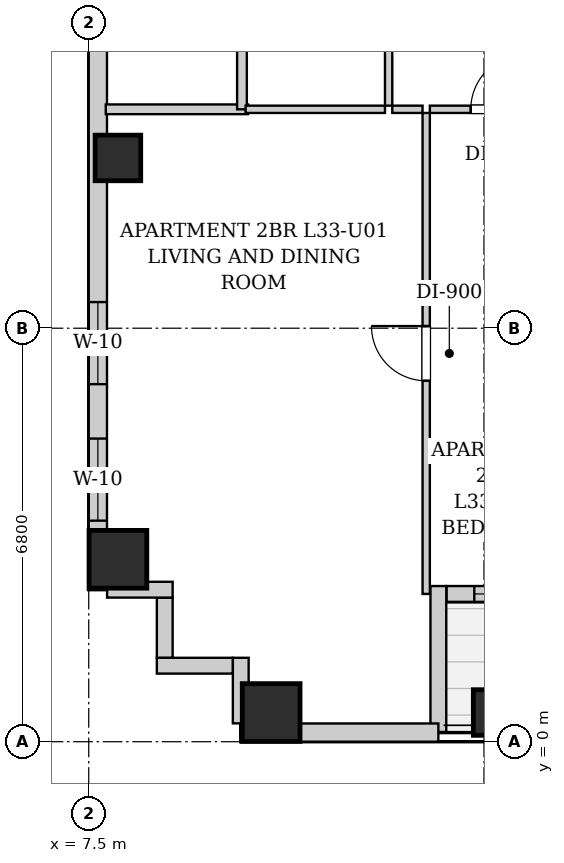
"""IFC4 building model, lengths in metres.
Left out: names, types, materials, properties, quantities, classifications, styles, units other than length and angle.
Written with IfcOpenShell. Run it as: python <this file> out.ifc"""

import sys

from ifc_helpers import new_model, si_unit, direction, frame, frame_2d, origin, origin_2d, place, context, subcontext, project, spatial, rectangle, extrude, element, fill, save


model = new_model("IFC4")
c1 = context("Model", 3, precision=1e-05, world=origin(), true_north=direction((0.0, 1.0)))
c2 = subcontext(c1, "Body", "Model", "MODEL_VIEW")
j1 = project(units=[si_unit("LENGTHUNIT", "METRE"), si_unit("PLANEANGLEUNIT", "RADIAN")], contexts=[c1])
p1 = place(None, origin())
s1 = spatial("IfcSite", under=j1, at=p1, CompositionType="ELEMENT")
p2 = place(p1, origin())
s2 = spatial("IfcBuilding", under=s1, at=p2, CompositionType="ELEMENT")
p3 = place(p2, frame((0.0, 0.0, 116.7)))
s3 = spatial("IfcBuildingStorey", under=s2, at=p3, CompositionType="ELEMENT", Elevation=116.7)
p4 = place(p3, frame((10.5, 0.48, 0.0), z_axis=(0.0, 0.0, 1.0), x_axis=(1.0, 0.0, 0.0)))
e1 = element("IfcColumn", 1, at=p4, inside=s3, PredefinedType="COLUMN", context=c2, shape_type="SweptSolid", body=[
    extrude(rectangle(XDim=0.95, YDim=0.95, at=origin_2d()), origin(), (0.0, 0.0, 1.0), 3.2),
])
p5 = place(p3, frame((14.2, 0.48, 0.0), z_axis=(0.0, 0.0, 1.0), x_axis=(1.0, 0.0, 0.0)))
e2 = element("IfcColumn", 2, at=p5, inside=s3, PredefinedType="COLUMN", context=c2, shape_type="SweptSolid", body=[
    extrude(rectangle(XDim=0.75, YDim=0.75, at=origin_2d()), origin(), (0.0, 0.0, 1.0), 3.2),
])
p6 = place(p3, frame((7.98, 3.0, 0.0), z_axis=(0.0, 0.0, 1.0), x_axis=(1.0, 0.0, 0.0)))
e3 = element("IfcColumn", 3, at=p6, inside=s3, PredefinedType="COLUMN", context=c2, shape_type="SweptSolid", body=[
    extrude(rectangle(XDim=0.95, YDim=0.95, at=origin_2d()), origin(), (0.0, 0.0, 1.0), 3.2),
])
p7 = place(p3, frame((7.98, 9.6, 0.0), z_axis=(0.0, 0.0, 1.0), x_axis=(1.0, 0.0, 0.0)))
e4 = element("IfcColumn", 4, at=p7, inside=s3, PredefinedType="COLUMN", context=c2, shape_type="SweptSolid", body=[
    extrude(rectangle(XDim=0.75, YDim=0.75, at=origin_2d()), origin(), (0.0, 0.0, 1.0), 3.2),
])
p8 = place(p3, frame((18.816, 2.43, 0.0), z_axis=(0.0, 0.0, 1.0), x_axis=(-1.0, 0.0, 0.0)))
e5 = element("IfcWall", 5, at=p8, inside=s3, PredefinedType="SOLIDWALL", context=c2, shape_type="SweptSolid", body=[
    extrude(rectangle(XDim=5.432, YDim=0.26, at=frame_2d((2.716, 0.0))), origin(), (0.0, 0.0, 1.0), 2.88),
])
p9 = place(p8, frame((2.161, 0.0, 0.0)))
e6 = element("IfcOpeningElement", 6, at=p9, cuts=e5, PredefinedType="OPENING", context=c2, shape_type="SweptSolid", body=[
    extrude(rectangle(XDim=1.1, YDim=2.0, at=frame_2d((0.55, 1.0))), frame((0.0, 0.14, 0.0), z_axis=(0.0, -1.0, 0.0), x_axis=(1.0, 0.0, 0.0)), (0.0, 0.0, 1.0), 0.28),
])
p10 = place(p8, frame((3.625, 0.0, 0.85)))
e7 = element("IfcOpeningElement", 7, at=p10, cuts=e5, PredefinedType="OPENING", context=c2, shape_type="SweptSolid", body=[
    extrude(rectangle(XDim=1.35, YDim=1.65, at=frame_2d((0.675, 0.825))), frame((0.0, 0.14, 0.0), z_axis=(0.0, -1.0, 0.0), x_axis=(1.0, 0.0, 0.0)), (0.0, 0.0, 1.0), 0.28),
])
p11 = place(p8, frame((1.321, 0.0, 0.55)))
e8 = element("IfcOpeningElement", 8, at=p11, cuts=e5, PredefinedType="OPENING", context=c2, shape_type="SweptSolid", body=[
    extrude(rectangle(XDim=0.68, YDim=1.2, at=frame_2d((0.34, 0.6))), frame((0.0, 0.14, 0.0), z_axis=(0.0, -1.0, 0.0), x_axis=(1.0, 0.0, 0.0)), (0.0, 0.0, 1.0), 0.28),
])
p12 = place(p3, frame((13.25, 2.56, 0.0), z_axis=(0.0, 0.0, 1.0), x_axis=(0.0, -1.0, 0.0)))
e9 = element("IfcWall", 9, at=p12, inside=s3, PredefinedType="SOLIDWALL", context=c2, shape_type="SweptSolid", body=[
    extrude(rectangle(XDim=2.4, YDim=0.26, at=frame_2d((1.2, 0.0))), origin(), (0.0, 0.0, 1.0), 2.88),
])
p13 = place(p3, frame((13.25, 0.15, 0.0), z_axis=(0.0, 0.0, 1.0), x_axis=(-1.0, 0.0, 0.0)))
e10 = element("IfcWall", 10, at=p13, inside=s3, PredefinedType="SOLIDWALL", context=c2, shape_type="SweptSolid", body=[
    extrude(rectangle(XDim=3.25, YDim=0.3, at=frame_2d((1.625, 0.0))), origin(), (0.0, 0.0, 1.0), 2.88),
])
p14 = place(p3, frame((7.65, 2.5, 0.0), z_axis=(0.0, 0.0, 1.0), x_axis=(0.0, 1.0, 0.0)))
e11 = element("IfcWall", 11, at=p14, inside=s3, PredefinedType="SOLIDWALL", context=c2, shape_type="SweptSolid", body=[
    extrude(rectangle(XDim=38.3, YDim=0.3, at=frame_2d((19.15, 0.0))), origin(), (0.0, 0.0, 1.0), 2.88),
])
p15 = place(p14, frame((3.38, 0.0, 0.55)))
e12 = element("IfcOpeningElement", 12, at=p15, cuts=e11, PredefinedType="OPENING", context=c2, shape_type="SweptSolid", body=[
    extrude(rectangle(XDim=1.35, YDim=1.2, at=frame_2d((0.675, 0.6))), frame((0.0, 0.16, 0.0), z_axis=(0.0, -1.0, 0.0), x_axis=(1.0, 0.0, 0.0)), (0.0, 0.0, 1.0), 0.32),
])
p16 = place(p14, frame((1.135, 0.0, 0.55)))
e13 = element("IfcOpeningElement", 13, at=p16, cuts=e11, PredefinedType="OPENING", context=c2, shape_type="SweptSolid", body=[
    extrude(rectangle(XDim=1.35, YDim=1.2, at=frame_2d((0.675, 0.6))), frame((0.0, 0.16, 0.0), z_axis=(0.0, -1.0, 0.0), x_axis=(1.0, 0.0, 0.0)), (0.0, 0.0, 1.0), 0.32),
])
p17 = place(p14, frame((33.946, 0.0, 0.55)))
e14 = element("IfcOpeningElement", 14, at=p17, cuts=e11, PredefinedType="OPENING", context=c2, shape_type="SweptSolid", body=[
    extrude(rectangle(XDim=1.35, YDim=1.2, at=frame_2d((0.675, 0.6))), frame((0.0, 0.16, 0.0), z_axis=(0.0, -1.0, 0.0), x_axis=(1.0, 0.0, 0.0)), (0.0, 0.0, 1.0), 0.32),
])
p18 = place(p14, frame((32.035, 0.0, 0.55)))
e15 = element("IfcOpeningElement", 15, at=p18, cuts=e11, PredefinedType="OPENING", context=c2, shape_type="SweptSolid", body=[
    extrude(rectangle(XDim=1.35, YDim=1.2, at=frame_2d((0.675, 0.6))), frame((0.0, 0.16, 0.0), z_axis=(0.0, -1.0, 0.0), x_axis=(1.0, 0.0, 0.0)), (0.0, 0.0, 1.0), 0.32),
])
p19 = place(p14, frame((15.65, 0.0, 0.55)))
e16 = element("IfcOpeningElement", 16, at=p19, cuts=e11, PredefinedType="OPENING", context=c2, shape_type="SweptSolid", body=[
    extrude(rectangle(XDim=1.35, YDim=1.2, at=frame_2d((0.675, 0.6))), frame((0.0, 0.16, 0.0), z_axis=(0.0, -1.0, 0.0), x_axis=(1.0, 0.0, 0.0)), (0.0, 0.0, 1.0), 0.32),
])
p20 = place(p14, frame((13.035, 0.0, 0.55)))
e17 = element("IfcOpeningElement", 17, at=p20, cuts=e11, PredefinedType="OPENING", context=c2, shape_type="SweptSolid", body=[
    extrude(rectangle(XDim=1.35, YDim=1.2, at=frame_2d((0.675, 0.6))), frame((0.0, 0.16, 0.0), z_axis=(0.0, -1.0, 0.0), x_axis=(1.0, 0.0, 0.0)), (0.0, 0.0, 1.0), 0.32),
])
p21 = place(p14, frame((22.831, 0.0, 0.55)))
e18 = element("IfcOpeningElement", 18, at=p21, cuts=e11, PredefinedType="OPENING", context=c2, shape_type="SweptSolid", body=[
    extrude(rectangle(XDim=1.35, YDim=1.2, at=frame_2d((0.675, 0.6))), frame((0.0, 0.16, 0.0), z_axis=(0.0, -1.0, 0.0), x_axis=(1.0, 0.0, 0.0)), (0.0, 0.0, 1.0), 0.32),
])
p22 = place(p14, frame((24.441, 0.0, 0.55)))
e19 = element("IfcOpeningElement", 19, at=p22, cuts=e11, PredefinedType="OPENING", context=c2, shape_type="SweptSolid", body=[
    extrude(rectangle(XDim=1.35, YDim=1.2, at=frame_2d((0.675, 0.6))), frame((0.0, 0.16, 0.0), z_axis=(0.0, -1.0, 0.0), x_axis=(1.0, 0.0, 0.0)), (0.0, 0.0, 1.0), 0.32),
])
p23 = place(p3, frame((10.0, 0.302, 0.0), z_axis=(0.0, 0.0, 1.0), x_axis=(0.0, 1.0, 0.0)))
e20 = element("IfcWall", 20, at=p23, inside=s3, PredefinedType="SOLIDWALL", context=c2, shape_type="SweptSolid", body=[
    extrude(rectangle(XDim=1.078, YDim=0.26, at=frame_2d((0.539, 0.0))), origin(), (0.0, 0.0, 1.0), 2.88),
])
p24 = place(p3, frame((9.868, 1.25, 0.0), z_axis=(0.0, 0.0, 1.0), x_axis=(-1.0, 0.0, 0.0)))
e21 = element("IfcWall", 21, at=p24, inside=s3, PredefinedType="SOLIDWALL", context=c2, shape_type="SweptSolid", body=[
    extrude(rectangle(XDim=1.248, YDim=0.26, at=frame_2d((0.624, 0.0))), origin(), (0.0, 0.0, 1.0), 2.88),
])
p25 = place(p3, frame((8.75, 1.382, 0.0), z_axis=(0.0, 0.0, 1.0), x_axis=(0.0, 1.0, 0.0)))
e22 = element("IfcWall", 22, at=p25, inside=s3, PredefinedType="SOLIDWALL", context=c2, shape_type="SweptSolid", body=[
    extrude(rectangle(XDim=0.986, YDim=0.26, at=frame_2d((0.493, 0.0))), origin(), (0.0, 0.0, 1.0), 2.88),
])
p26 = place(p3, frame((8.88, 2.5, 0.0), z_axis=(0.0, 0.0, 1.0), x_axis=(-1.0, 0.0, 0.0)))
e23 = element("IfcWall", 23, at=p26, inside=s3, PredefinedType="SOLIDWALL", context=c2, shape_type="SweptSolid", body=[
    extrude(rectangle(XDim=1.078, YDim=0.26, at=frame_2d((0.539, 0.0))), origin(), (0.0, 0.0, 1.0), 2.88),
])
p27 = place(p3, frame((7.78, 10.4, 0.0), z_axis=(0.0, 0.0, 1.0), x_axis=(1.0, 0.0, 0.0)))
e24 = element("IfcWall", 24, at=p27, inside=s3, PredefinedType="PARTITIONING", context=c2, shape_type="SweptSolid", body=[
    extrude(rectangle(XDim=2.34, YDim=0.16, at=frame_2d((1.17, 0.0))), origin(), (0.0, 0.0, 1.0), 2.88),
])
p28 = place(p3, frame((10.02, 10.4, 0.0), z_axis=(0.0, 0.0, 1.0), x_axis=(0.0, 1.0, 0.0)))
e25 = element("IfcWall", 25, at=p28, inside=s3, PredefinedType="PARTITIONING", context=c2, shape_type="SweptSolid", body=[
    extrude(rectangle(XDim=2.91, YDim=0.16, at=frame_2d((1.455, 0.0))), origin(), (0.0, 0.0, 1.0), 2.88),
])
p29 = place(p3, frame((12.432, 10.46, 0.0), z_axis=(0.0, 0.0, 1.0), x_axis=(0.0, 1.0, 0.0)))
e26 = element("IfcWall", 26, at=p29, inside=s3, PredefinedType="PARTITIONING", context=c2, shape_type="SweptSolid", body=[
    extrude(rectangle(XDim=2.85, YDim=0.12, at=frame_2d((1.425, 0.0))), origin(), (0.0, 0.0, 1.0), 2.88),
])
p30 = place(p29, frame((0.995, 0.0, 0.0)))
e27 = element("IfcOpeningElement", 27, at=p30, cuts=e26, PredefinedType="OPENING", context=c2, shape_type="SweptSolid", body=[
    extrude(rectangle(XDim=0.86, YDim=2.05, at=frame_2d((0.43, 1.025))), frame((0.0, 0.07, 0.0), z_axis=(0.0, -1.0, 0.0), x_axis=(1.0, 0.0, 0.0)), (0.0, 0.0, 1.0), 0.14),
])
p31 = place(p3, frame((10.08, 10.4, 0.0), z_axis=(0.0, 0.0, 1.0), x_axis=(1.0, 0.0, 0.0)))
e28 = element("IfcWall", 28, at=p31, inside=s3, PredefinedType="PARTITIONING", context=c2, shape_type="SweptSolid", body=[
    extrude(rectangle(XDim=2.292, YDim=0.12, at=frame_2d((1.146, 0.0))), origin(), (0.0, 0.0, 1.0), 2.88),
])
p32 = place(p3, frame((12.492, 10.4, 0.0), z_axis=(0.0, 0.0, 1.0), x_axis=(1.0, 0.0, 0.0)))
e29 = element("IfcWall", 29, at=p32, inside=s3, PredefinedType="PARTITIONING", context=c2, shape_type="SweptSolid", body=[
    extrude(rectangle(XDim=0.498, YDim=0.12, at=frame_2d((0.249, 0.0))), origin(), (0.0, 0.0, 1.0), 2.88),
])
p33 = place(p3, frame((13.11, 10.4, 0.0), z_axis=(0.0, 0.0, 1.0), x_axis=(1.0, 0.0, 0.0)))
e30 = element("IfcWall", 30, at=p33, inside=s3, PredefinedType="PARTITIONING", context=c2, shape_type="SweptSolid", body=[
    extrude(rectangle(XDim=2.245, YDim=0.12, at=frame_2d((1.123, 0.0))), origin(), (0.0, 0.0, 1.0), 2.88),
])
p34 = place(p33, frame((0.673, 0.0, 0.0)))
e31 = element("IfcOpeningElement", 31, at=p34, cuts=e30, PredefinedType="OPENING", context=c2, shape_type="SweptSolid", body=[
    extrude(rectangle(XDim=0.9, YDim=2.05, at=frame_2d((0.45, 1.025))), frame((0.0, 0.07, 0.0), z_axis=(0.0, -1.0, 0.0), x_axis=(1.0, 0.0, 0.0)), (0.0, 0.0, 1.0), 0.14),
])
p35 = place(p3, frame((13.05, 2.43, 0.0), z_axis=(0.0, 0.0, 1.0), x_axis=(0.0, 1.0, 0.0)))
e32 = element("IfcWall", 32, at=p35, inside=s3, PredefinedType="PARTITIONING", context=c2, shape_type="SweptSolid", body=[
    extrude(rectangle(XDim=7.91, YDim=0.12, at=frame_2d((3.955, 0.0))), origin(), (0.0, 0.0, 1.0), 2.88),
])
p36 = place(p35, frame((3.505, 0.0, 0.0)))
e33 = element("IfcOpeningElement", 33, at=p36, cuts=e32, PredefinedType="OPENING", context=c2, shape_type="SweptSolid", body=[
    extrude(rectangle(XDim=0.9, YDim=2.05, at=frame_2d((0.45, 1.025))), frame((0.0, 0.07, 0.0), z_axis=(0.0, -1.0, 0.0), x_axis=(1.0, 0.0, 0.0)), (0.0, 0.0, 1.0), 0.14),
])
p37 = place(p34, origin())
e34 = element("IfcDoor", 34, at=p37, inside=s3, OperationType="SINGLE_SWING_RIGHT", PredefinedType="DOOR", context=c2, shape_type="SweptSolid", body=[
    extrude(rectangle(XDim=0.9, YDim=2.05, at=frame_2d((0.45, 1.025))), frame((0.0, 0.025, 0.0), z_axis=(0.0, -1.0, 0.0), x_axis=(1.0, 0.0, 0.0)), (0.0, 0.0, 1.0), 0.05),
])
fill(e31, e34)
p38 = place(p36, origin())
e35 = element("IfcDoor", 35, at=p38, inside=s3, OperationType="SINGLE_SWING_RIGHT", PredefinedType="DOOR", context=c2, shape_type="SweptSolid", body=[
    extrude(rectangle(XDim=0.9, YDim=2.05, at=frame_2d((0.45, 1.025))), frame((0.0, 0.025, 0.0), z_axis=(0.0, -1.0, 0.0), x_axis=(1.0, 0.0, 0.0)), (0.0, 0.0, 1.0), 0.05),
])
fill(e33, e35)
p39 = place(p15, origin())
e36 = element("IfcWindow", 36, at=p39, inside=s3, PartitioningType="SINGLE_PANEL", PredefinedType="WINDOW", context=c2, shape_type="SweptSolid", body=[
    extrude(rectangle(XDim=1.35, YDim=1.2, at=frame_2d((0.675, 0.6))), frame((0.0, 0.03, 0.0), z_axis=(0.0, -1.0, 0.0), x_axis=(1.0, 0.0, 0.0)), (0.0, 0.0, 1.0), 0.06),
])
fill(e12, e36)
p40 = place(p16, origin())
e37 = element("IfcWindow", 37, at=p40, inside=s3, PartitioningType="SINGLE_PANEL", PredefinedType="WINDOW", context=c2, shape_type="SweptSolid", body=[
    extrude(rectangle(XDim=1.35, YDim=1.2, at=frame_2d((0.675, 0.6))), frame((0.0, 0.03, 0.0), z_axis=(0.0, -1.0, 0.0), x_axis=(1.0, 0.0, 0.0)), (0.0, 0.0, 1.0), 0.06),
])
fill(e13, e37)
p41 = place(p10, origin())
e38 = element("IfcWindow", 38, at=p41, inside=s3, PartitioningType="SINGLE_PANEL", PredefinedType="WINDOW", context=c2, shape_type="SweptSolid", body=[
    extrude(rectangle(XDim=1.35, YDim=1.65, at=frame_2d((0.675, 0.825))), frame((0.0, 0.03, 0.0), z_axis=(0.0, -1.0, 0.0), x_axis=(1.0, 0.0, 0.0)), (0.0, 0.0, 1.0), 0.06),
])
fill(e7, e38)
save(model, sys.argv[1])
